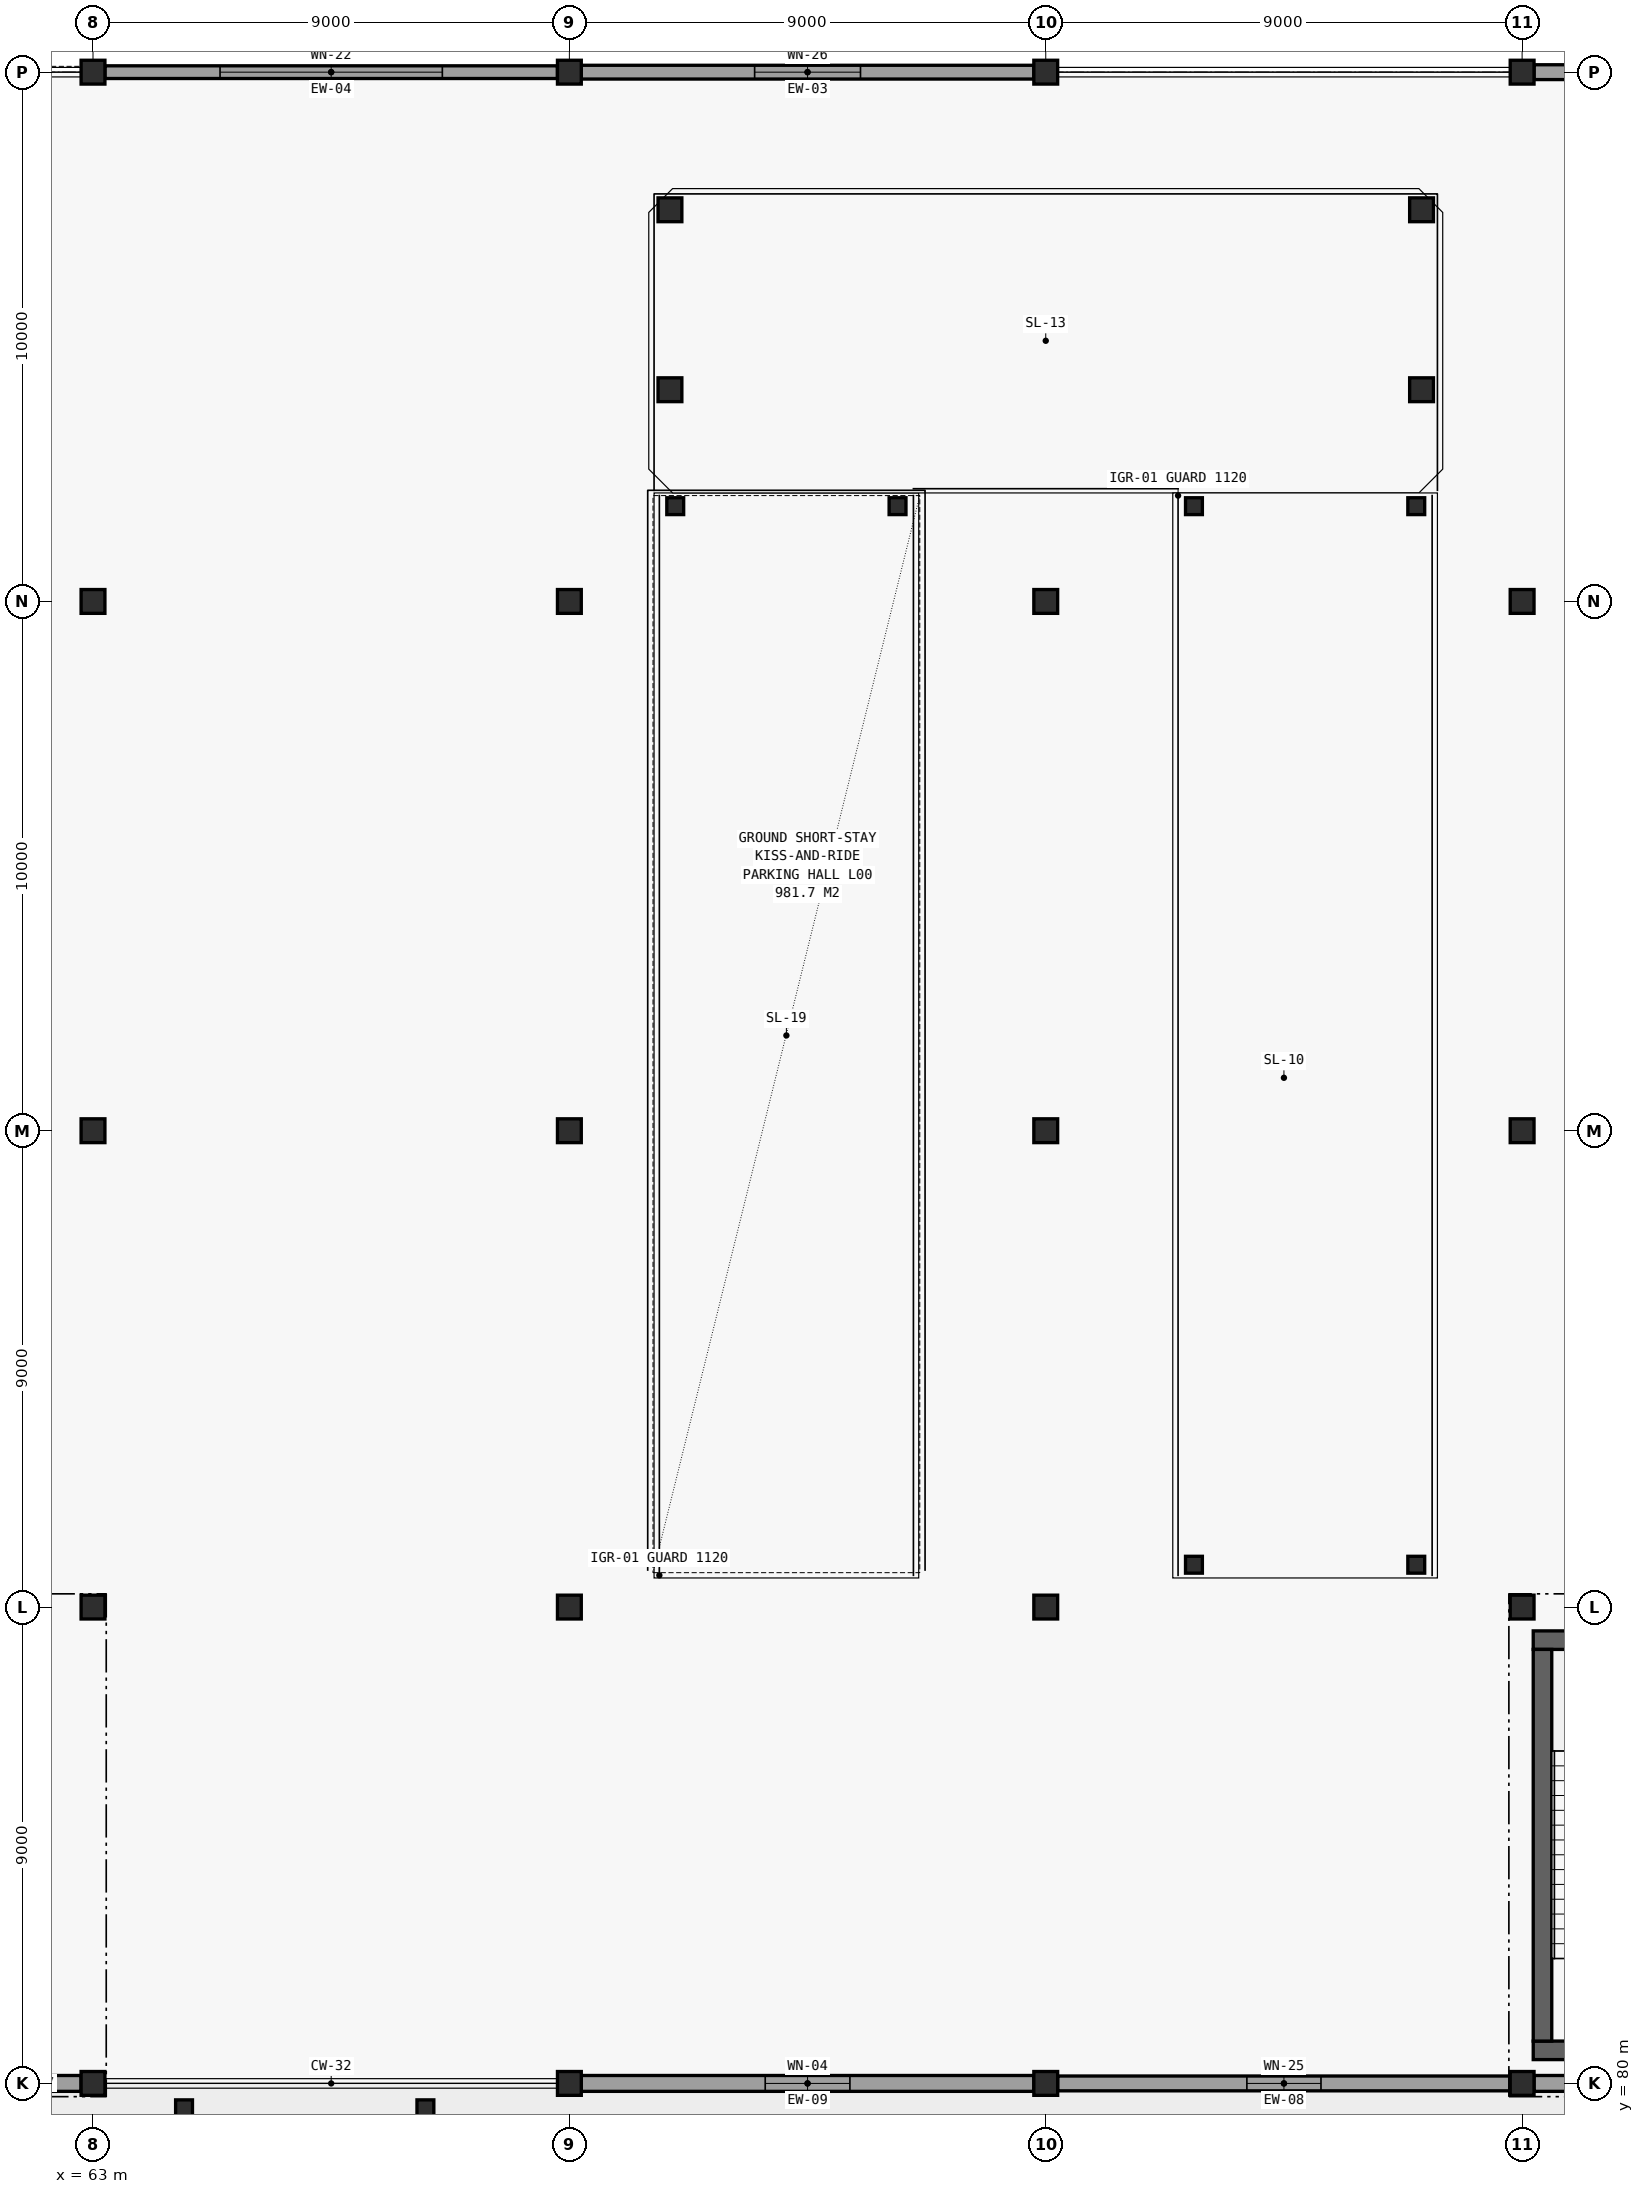
"""IFC4 building model, lengths in metres.
Left out: names, types, materials, properties, quantities, classifications, styles, units other than length and angle.
Written with IfcOpenShell. Run it as: python <this file> out.ifc"""

import sys

from ifc_helpers import new_model, si_unit, direction, frame, frame_2d, origin, origin_2d, place, context, subcontext, project, spatial, rectangle, hollow_rectangle, hollow_circle, extrude, element, fill, save


model = new_model("IFC4")
c1 = context("Model", 3, precision=1e-05, world=origin(), true_north=direction((0.0, 1.0)))
c2 = subcontext(c1, "Body", "Model", "MODEL_VIEW")
j1 = project(units=[si_unit("LENGTHUNIT", "METRE"), si_unit("PLANEANGLEUNIT", "RADIAN")], contexts=[c1])
p1 = place(None, origin())
s1 = spatial("IfcSite", under=j1, at=p1, CompositionType="ELEMENT")
p2 = place(p1, origin())
s2 = spatial("IfcBuilding", under=s1, at=p2, CompositionType="ELEMENT")
p3 = place(p2, origin())
s3 = spatial("IfcBuildingStorey", under=s2, at=p3, CompositionType="ELEMENT", Elevation=0.0)
for number, where, z_axis, x_axis in (
    (1, (63.0, 80.0, 0.0), (0.0, 0.0, 1.0), (1.0, 0.0, 0.0)),
    (2, (63.0, 89.0, 0.0), (0.0, 0.0, 1.0), (1.0, 0.0, 0.0)),
    (3, (63.0, 98.0, 0.0), (0.0, 0.0, 1.0), (1.0, 0.0, 0.0)),
    (4, (63.0, 108.0, 0.0), (0.0, 0.0, 1.0), (1.0, 0.0, 0.0)),
    (5, (63.0, 118.0, 0.0), (0.0, 0.0, 1.0), (1.0, 0.0, 0.0)),
):
    element("IfcColumn", number, at=place(p3, frame(where, z_axis=z_axis, x_axis=x_axis)), inside=s3, PredefinedType="COLUMN", context=c2, shape_type="SweptSolid", body=[
        extrude(hollow_rectangle(XDim=0.45, YDim=0.45, WallThickness=0.022, at=origin_2d()), origin(), (0.0, 0.0, 1.0), 5.1),
    ])
for number, where, z_axis, x_axis in (
    (6, (64.72, 79.53, 0.0), (0.0, 0.0, 1.0), (1.0, 0.0, 0.0)),
    (7, (69.28, 79.53, 0.0), (0.0, 0.0, 1.0), (1.0, 0.0, 0.0)),
):
    element("IfcColumn", number, at=place(p3, frame(where, z_axis=z_axis, x_axis=x_axis)), inside=s3, PredefinedType="COLUMN", context=c2, shape_type="SweptSolid", body=[
        extrude(hollow_circle(Radius=0.159, WallThickness=0.01, at=origin_2d()), origin(), (0.0, 0.0, 1.0), 5.1),
    ])
for number, where, z_axis, x_axis in (
    (8, (72.0, 80.0, 0.0), (0.0, 0.0, 1.0), (1.0, 0.0, 0.0)),
    (9, (72.0, 89.0, 0.0), (0.0, 0.0, 1.0), (1.0, 0.0, 0.0)),
    (10, (72.0, 98.0, 0.0), (0.0, 0.0, 1.0), (1.0, 0.0, 0.0)),
    (11, (72.0, 108.0, 0.0), (0.0, 0.0, 1.0), (1.0, 0.0, 0.0)),
    (12, (72.0, 118.0, 0.0), (0.0, 0.0, 1.0), (1.0, 0.0, 0.0)),
    (13, (73.9, 112.0, 0.0), (0.0, 0.0, 1.0), (1.0, 0.0, 0.0)),
    (14, (73.9, 115.4, 0.0), (0.0, 0.0, 1.0), (1.0, 0.0, 0.0)),
):
    element("IfcColumn", number, at=place(p3, frame(where, z_axis=z_axis, x_axis=x_axis)), inside=s3, PredefinedType="COLUMN", context=c2, shape_type="SweptSolid", body=[
        extrude(hollow_rectangle(XDim=0.45, YDim=0.45, WallThickness=0.022, at=origin_2d()), origin(), (0.0, 0.0, 1.0), 5.1),
    ])
for number, where, z_axis, x_axis in (
    (15, (74.0, 109.8, 0.0), (0.0, 0.0, 1.0), (1.0, 0.0, 0.0)),
    (16, (78.2, 109.8, 0.0), (0.0, 0.0, 1.0), (1.0, 0.0, 0.0)),
):
    element("IfcColumn", number, at=place(p3, frame(where, z_axis=z_axis, x_axis=x_axis)), inside=s3, PredefinedType="COLUMN", context=c2, shape_type="SweptSolid", body=[
        extrude(hollow_circle(Radius=0.159, WallThickness=0.01, at=origin_2d()), origin(), (0.0, 0.0, 1.0), 2.15),
    ])
for number, where, z_axis, x_axis in (
    (17, (81.0, 80.0, 0.0), (0.0, 0.0, 1.0), (1.0, 0.0, 0.0)),
    (18, (81.0, 89.0, 0.0), (0.0, 0.0, 1.0), (1.0, 0.0, 0.0)),
    (19, (81.0, 98.0, 0.0), (0.0, 0.0, 1.0), (1.0, 0.0, 0.0)),
    (20, (81.0, 108.0, 0.0), (0.0, 0.0, 1.0), (1.0, 0.0, 0.0)),
    (21, (81.0, 118.0, 0.0), (0.0, 0.0, 1.0), (1.0, 0.0, 0.0)),
):
    element("IfcColumn", number, at=place(p3, frame(where, z_axis=z_axis, x_axis=x_axis)), inside=s3, PredefinedType="COLUMN", context=c2, shape_type="SweptSolid", body=[
        extrude(hollow_rectangle(XDim=0.45, YDim=0.45, WallThickness=0.022, at=origin_2d()), origin(), (0.0, 0.0, 1.0), 5.1),
    ])
p4 = place(p3, frame((83.8, 89.8, 0.0), z_axis=(0.0, 0.0, 1.0), x_axis=(1.0, 0.0, 0.0)))
e22 = element("IfcColumn", 22, at=p4, inside=s3, PredefinedType="COLUMN", context=c2, shape_type="SweptSolid", body=[
    extrude(hollow_circle(Radius=0.159, WallThickness=0.01, at=origin_2d()), origin(), (0.0, 0.0, 1.0), 4.7),
])
p5 = place(p3, frame((83.8, 109.8, 0.0), z_axis=(0.0, 0.0, 1.0), x_axis=(1.0, 0.0, 0.0)))
e23 = element("IfcColumn", 23, at=p5, inside=s3, PredefinedType="COLUMN", context=c2, shape_type="SweptSolid", body=[
    extrude(hollow_circle(Radius=0.159, WallThickness=0.01, at=origin_2d()), origin(), (0.0, 0.0, 1.0), 2.15),
])
p6 = place(p3, frame((88.0, 89.8, 0.0), z_axis=(0.0, 0.0, 1.0), x_axis=(1.0, 0.0, 0.0)))
e24 = element("IfcColumn", 24, at=p6, inside=s3, PredefinedType="COLUMN", context=c2, shape_type="SweptSolid", body=[
    extrude(hollow_circle(Radius=0.159, WallThickness=0.01, at=origin_2d()), origin(), (0.0, 0.0, 1.0), 4.7),
])
p7 = place(p3, frame((88.0, 109.8, 0.0), z_axis=(0.0, 0.0, 1.0), x_axis=(1.0, 0.0, 0.0)))
e25 = element("IfcColumn", 25, at=p7, inside=s3, PredefinedType="COLUMN", context=c2, shape_type="SweptSolid", body=[
    extrude(hollow_circle(Radius=0.159, WallThickness=0.01, at=origin_2d()), origin(), (0.0, 0.0, 1.0), 2.15),
])
for number, where, z_axis, x_axis in (
    (26, (88.1, 112.0, 0.0), (0.0, 0.0, 1.0), (1.0, 0.0, 0.0)),
    (27, (88.1, 115.4, 0.0), (0.0, 0.0, 1.0), (1.0, 0.0, 0.0)),
    (28, (90.0, 80.0, 0.0), (0.0, 0.0, 1.0), (1.0, 0.0, 0.0)),
    (29, (90.0, 89.0, 0.0), (0.0, 0.0, 1.0), (1.0, 0.0, 0.0)),
    (30, (90.0, 98.0, 0.0), (0.0, 0.0, 1.0), (1.0, 0.0, 0.0)),
    (31, (90.0, 108.0, 0.0), (0.0, 0.0, 1.0), (1.0, 0.0, 0.0)),
    (32, (90.0, 118.0, 0.0), (0.0, 0.0, 1.0), (1.0, 0.0, 0.0)),
):
    element("IfcColumn", number, at=place(p3, frame(where, z_axis=z_axis, x_axis=x_axis)), inside=s3, PredefinedType="COLUMN", context=c2, shape_type="SweptSolid", body=[
        extrude(hollow_rectangle(XDim=0.45, YDim=0.45, WallThickness=0.022, at=origin_2d()), origin(), (0.0, 0.0, 1.0), 5.1),
    ])
p8 = place(p3, frame((54.225, 80.0, 0.0), z_axis=(0.0, 0.0, 1.0), x_axis=(1.0, 0.0, 0.0)))
e33 = element("IfcWall", 33, at=p8, inside=s3, PredefinedType="SOLIDWALL", context=c2, shape_type="SweptSolid", body=[
    extrude(rectangle(XDim=8.55, YDim=0.3, at=frame_2d((4.275, 0.0))), origin(), (0.0, 0.0, 1.0), 4.19),
])
p9 = place(p8, frame((7.075, 0.0, 0.0), z_axis=(0.0, 0.0, 1.0), x_axis=(-1.0, 0.0, 0.0)))
e34 = element("IfcOpeningElement", 34, at=p9, cuts=e33, PredefinedType="OPENING", context=c2, shape_type="SweptSolid", body=[
    extrude(rectangle(XDim=1.9, YDim=2.4, at=frame_2d((0.95, 1.2))), frame((0.0, 0.161, 0.0), z_axis=(0.0, -1.0, 0.0), x_axis=(1.0, 0.0, 0.0)), (0.0, 0.0, 1.0), 0.322),
])
p10 = place(p3, frame((72.225, 80.0, 0.0), z_axis=(0.0, 0.0, 1.0), x_axis=(1.0, 0.0, 0.0)))
e35 = element("IfcWall", 35, at=p10, inside=s3, PredefinedType="SOLIDWALL", context=c2, shape_type="SweptSolid", body=[
    extrude(rectangle(XDim=8.55, YDim=0.3, at=frame_2d((4.275, 0.0))), origin(), (0.0, 0.0, 1.0), 4.19),
])
p11 = place(p10, frame((3.475, 0.0, 0.95)))
e36 = element("IfcOpeningElement", 36, at=p11, cuts=e35, PredefinedType="OPENING", context=c2, shape_type="SweptSolid", body=[
    extrude(rectangle(XDim=1.6, YDim=2.1, at=frame_2d((0.8, 1.05))), frame((0.0, 0.161, 0.0), z_axis=(0.0, -1.0, 0.0), x_axis=(1.0, 0.0, 0.0)), (0.0, 0.0, 1.0), 0.322),
])
p12 = place(p3, frame((81.225, 80.0, 0.0), z_axis=(0.0, 0.0, 1.0), x_axis=(1.0, 0.0, 0.0)))
e37 = element("IfcWall", 37, at=p12, inside=s3, PredefinedType="SOLIDWALL", context=c2, shape_type="SweptSolid", body=[
    extrude(rectangle(XDim=8.55, YDim=0.28, at=frame_2d((4.275, 0.0))), origin(), (0.0, 0.0, 1.0), 4.19),
])
p13 = place(p12, frame((3.575, 0.0, 0.95)))
e38 = element("IfcOpeningElement", 38, at=p13, cuts=e37, PredefinedType="OPENING", context=c2, shape_type="SweptSolid", body=[
    extrude(rectangle(XDim=1.4, YDim=2.0, at=frame_2d((0.7, 1.0))), frame((0.0, 0.151, 0.0), z_axis=(0.0, -1.0, 0.0), x_axis=(1.0, 0.0, 0.0)), (0.0, 0.0, 1.0), 0.302),
])
p14 = place(p3, frame((90.225, 80.0, 0.0), z_axis=(0.0, 0.0, 1.0), x_axis=(1.0, 0.0, 0.0)))
e39 = element("IfcWall", 39, at=p14, inside=s3, PredefinedType="SOLIDWALL", context=c2, shape_type="SweptSolid", body=[
    extrude(rectangle(XDim=8.55, YDim=0.3, at=frame_2d((4.275, 0.0))), origin(), (0.0, 0.0, 1.0), 4.19),
])
p15 = place(p14, frame((7.075, 0.0, 0.0), z_axis=(0.0, 0.0, 1.0), x_axis=(-1.0, 0.0, 0.0)))
e40 = element("IfcOpeningElement", 40, at=p15, cuts=e39, PredefinedType="OPENING", context=c2, shape_type="SweptSolid", body=[
    extrude(rectangle(XDim=1.9, YDim=2.4, at=frame_2d((0.95, 1.2))), frame((0.0, 0.161, 0.0), z_axis=(0.0, -1.0, 0.0), x_axis=(1.0, 0.0, 0.0)), (0.0, 0.0, 1.0), 0.322),
])
p16 = place(p3, frame((98.775, 118.0, 0.0), z_axis=(0.0, 0.0, 1.0), x_axis=(-1.0, 0.0, 0.0)))
e41 = element("IfcWall", 41, at=p16, inside=s3, PredefinedType="SOLIDWALL", context=c2, shape_type="SweptSolid", body=[
    extrude(rectangle(XDim=8.55, YDim=0.28, at=frame_2d((4.275, 0.0))), origin(), (0.0, 0.0, 1.0), 4.19),
])
p17 = place(p16, frame((2.875, 0.0, 0.95)))
e42 = element("IfcOpeningElement", 42, at=p17, cuts=e41, PredefinedType="OPENING", context=c2, shape_type="SweptSolid", body=[
    extrude(rectangle(XDim=2.8, YDim=1.1, at=frame_2d((1.4, 0.55))), frame((0.0, 0.151, 0.0), z_axis=(0.0, -1.0, 0.0), x_axis=(1.0, 0.0, 0.0)), (0.0, 0.0, 1.0), 0.302),
])
p18 = place(p3, frame((80.775, 118.0, 0.0), z_axis=(0.0, 0.0, 1.0), x_axis=(-1.0, 0.0, 0.0)))
e43 = element("IfcWall", 43, at=p18, inside=s3, PredefinedType="SOLIDWALL", context=c2, shape_type="SweptSolid", body=[
    extrude(rectangle(XDim=8.55, YDim=0.26, at=frame_2d((4.275, 0.0))), origin(), (0.0, 0.0, 1.0), 4.19),
])
p19 = place(p18, frame((3.275, 0.0, 0.95)))
e44 = element("IfcOpeningElement", 44, at=p19, cuts=e43, PredefinedType="OPENING", context=c2, shape_type="SweptSolid", body=[
    extrude(rectangle(XDim=2.0, YDim=1.1, at=frame_2d((1.0, 0.55))), frame((0.0, 0.141, 0.0), z_axis=(0.0, -1.0, 0.0), x_axis=(1.0, 0.0, 0.0)), (0.0, 0.0, 1.0), 0.282),
])
p20 = place(p3, frame((71.775, 118.0, 0.0), z_axis=(0.0, 0.0, 1.0), x_axis=(-1.0, 0.0, 0.0)))
e45 = element("IfcWall", 45, at=p20, inside=s3, PredefinedType="SOLIDWALL", context=c2, shape_type="SweptSolid", body=[
    extrude(rectangle(XDim=8.55, YDim=0.24, at=frame_2d((4.275, 0.0))), origin(), (0.0, 0.0, 1.0), 4.19),
])
p21 = place(p20, frame((2.175, 0.0, 0.95)))
e46 = element("IfcOpeningElement", 46, at=p21, cuts=e45, PredefinedType="OPENING", context=c2, shape_type="SweptSolid", body=[
    extrude(rectangle(XDim=4.2, YDim=1.5, at=frame_2d((2.1, 0.75))), frame((0.0, 0.131, 0.0), z_axis=(0.0, -1.0, 0.0), x_axis=(1.0, 0.0, 0.0)), (0.0, 0.0, 1.0), 0.262),
])
for number, where, z_axis, x_axis in (
    (47, (90.21, 80.625, 0.0), (0.0, 0.0, 1.0), (1.0, 0.0, 0.0)),
    (48, (90.21, 88.375, 0.0), (0.0, 0.0, 1.0), (1.0, 0.0, 0.0)),
):
    element("IfcWall", number, at=place(p3, frame(where, z_axis=z_axis, x_axis=x_axis)), inside=s3, PredefinedType="SHEAR", context=c2, shape_type="SweptSolid", body=[
        extrude(rectangle(XDim=3.98, YDim=0.35, at=frame_2d((1.99, 0.0))), origin(), (0.0, 0.0, 1.0), 4.84),
    ])
p22 = place(p3, frame((90.385, 80.8, 0.0), z_axis=(0.0, 0.0, 1.0), x_axis=(0.0, 1.0, 0.0)))
e49 = element("IfcWall", 49, at=p22, inside=s3, PredefinedType="SHEAR", context=c2, shape_type="SweptSolid", body=[
    extrude(rectangle(XDim=7.4, YDim=0.35, at=frame_2d((3.7, 0.0))), origin(), (0.0, 0.0, 1.0), 4.84),
])
p23 = place(p11, origin())
e50 = element("IfcWindow", 50, at=p23, inside=s3, PartitioningType="SINGLE_PANEL", PredefinedType="WINDOW", context=c2, shape_type="SweptSolid", body=[
    extrude(rectangle(XDim=1.6, YDim=2.1, at=frame_2d((0.8, 1.05))), frame((0.0, 0.03, 0.0), z_axis=(0.0, -1.0, 0.0), x_axis=(1.0, 0.0, 0.0)), (0.0, 0.0, 1.0), 0.06),
])
fill(e36, e50)
p24 = place(p13, origin())
e51 = element("IfcWindow", 51, at=p24, inside=s3, PartitioningType="SINGLE_PANEL", PredefinedType="WINDOW", context=c2, shape_type="SweptSolid", body=[
    extrude(rectangle(XDim=1.4, YDim=2.0, at=frame_2d((0.7, 1.0))), frame((0.0, 0.03, 0.0), z_axis=(0.0, -1.0, 0.0), x_axis=(1.0, 0.0, 0.0)), (0.0, 0.0, 1.0), 0.06),
])
fill(e38, e51)
p25 = place(p19, origin())
e52 = element("IfcWindow", 52, at=p25, inside=s3, PartitioningType="SINGLE_PANEL", PredefinedType="WINDOW", context=c2, shape_type="SweptSolid", body=[
    extrude(rectangle(XDim=2.0, YDim=1.1, at=frame_2d((1.0, 0.55))), frame((0.0, 0.03, 0.0), z_axis=(0.0, -1.0, 0.0), x_axis=(1.0, 0.0, 0.0)), (0.0, 0.0, 1.0), 0.06),
])
fill(e44, e52)
p26 = place(p21, origin())
e53 = element("IfcWindow", 53, at=p26, inside=s3, PartitioningType="SINGLE_PANEL", PredefinedType="WINDOW", context=c2, shape_type="SweptSolid", body=[
    extrude(rectangle(XDim=4.2, YDim=1.5, at=frame_2d((2.1, 0.75))), frame((0.0, 0.03, 0.0), z_axis=(0.0, -1.0, 0.0), x_axis=(1.0, 0.0, 0.0)), (0.0, 0.0, 1.0), 0.06),
])
fill(e46, e53)
save(model, sys.argv[1])
